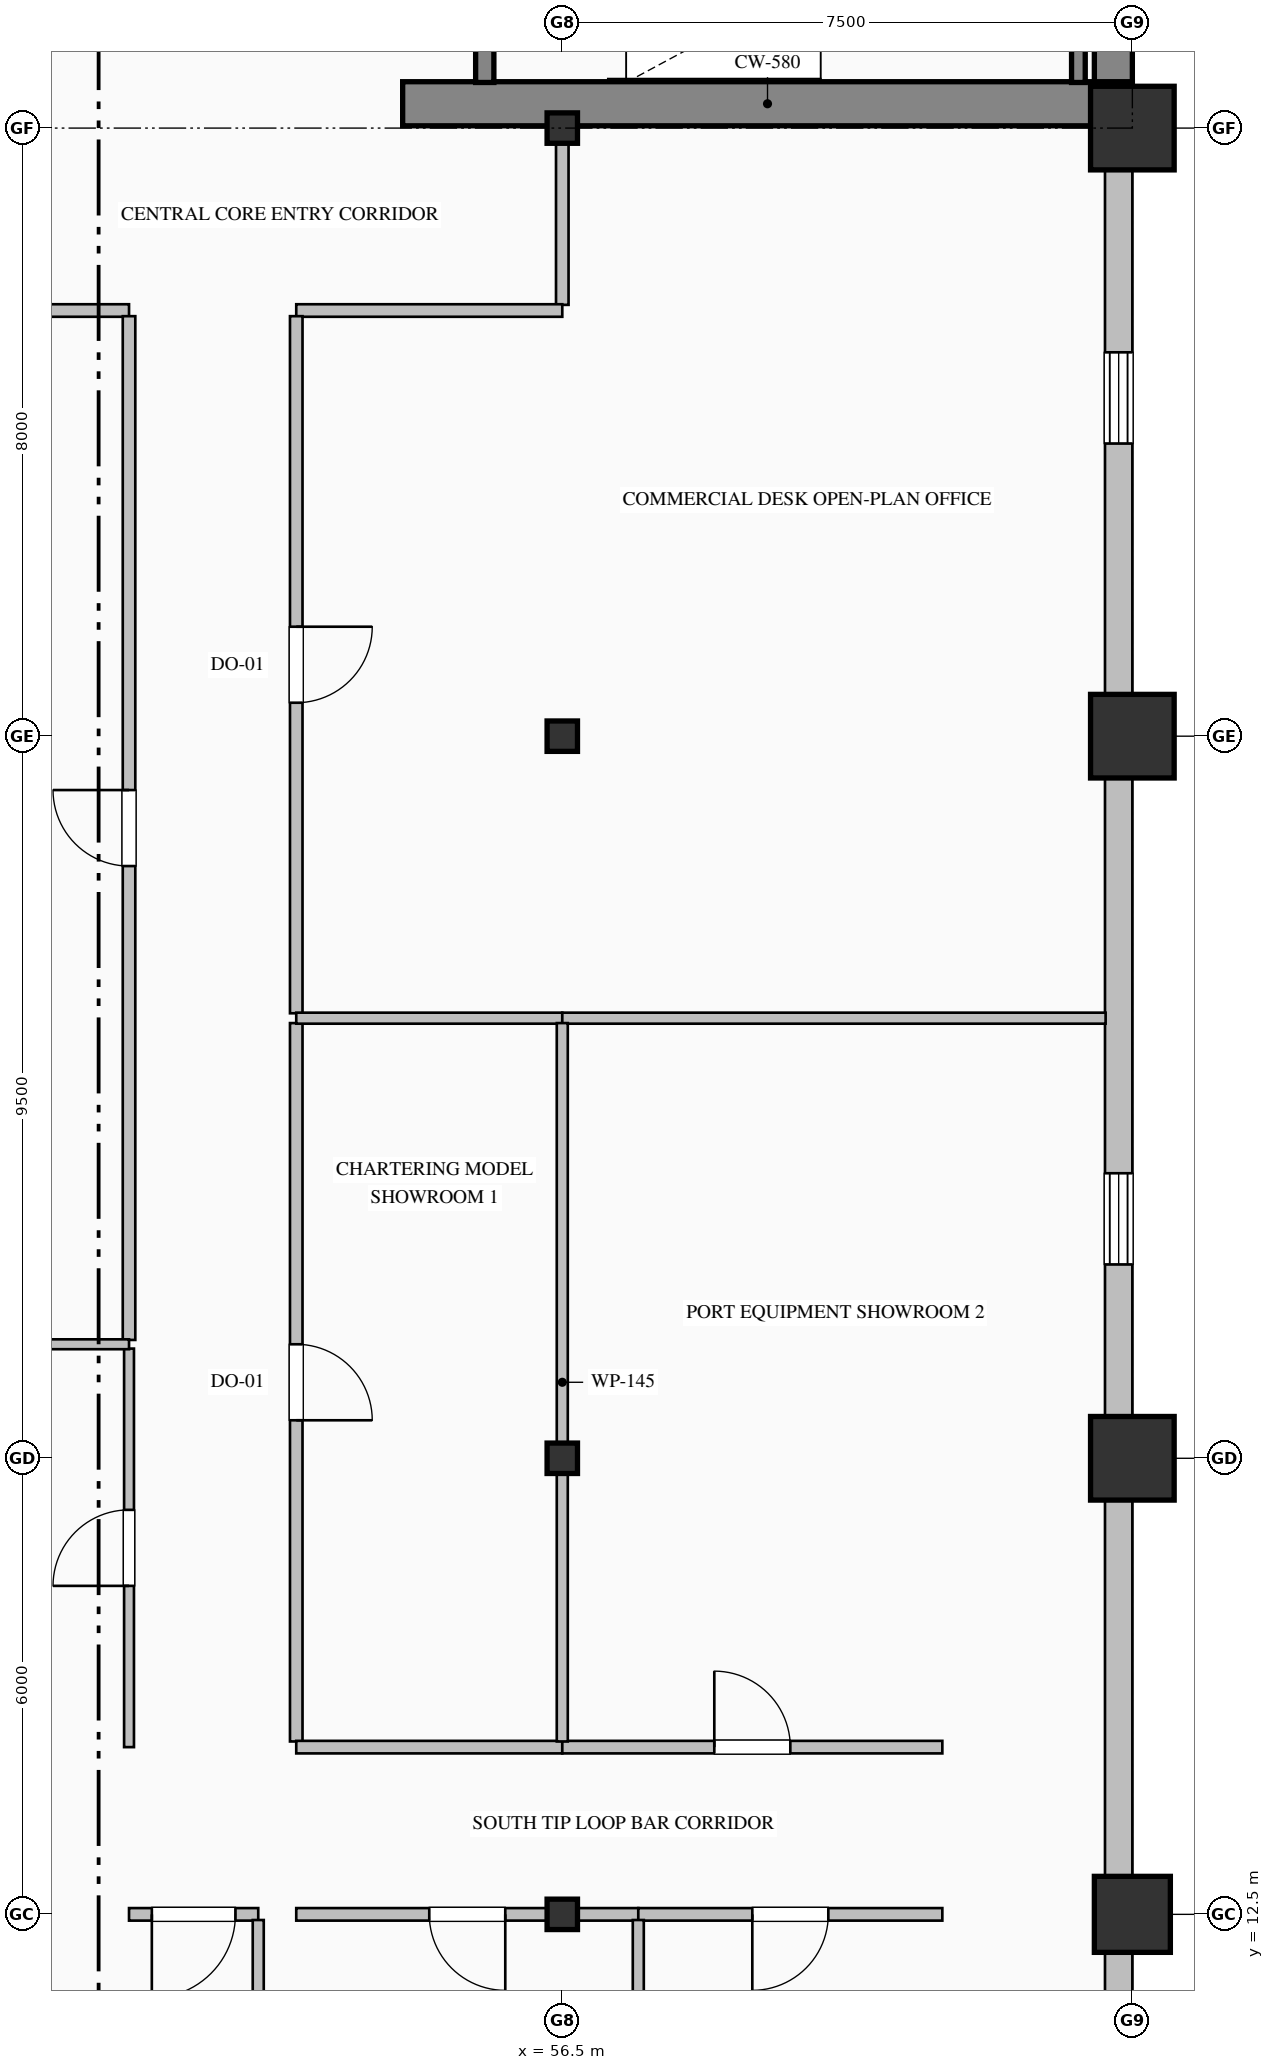
"""IFC4 building model, lengths in metres.
Left out: names, types, materials, properties, quantities, classifications, styles, units other than length and angle.
Written with IfcOpenShell. Run it as: python <this file> out.ifc"""

import sys

from ifc_helpers import new_model, si_unit, direction, frame, frame_2d, origin, origin_2d, place, context, subcontext, project, spatial, rectangle, hollow_rectangle, hollow_circle, i_section, extrude, element, fill, save


model = new_model("IFC4")
c1 = context("Model", 3, precision=1e-05, world=origin(), true_north=direction((0.0, 1.0)))
c2 = subcontext(c1, "Body", "Model", "MODEL_VIEW")
j1 = project(units=[si_unit("LENGTHUNIT", "METRE"), si_unit("PLANEANGLEUNIT", "RADIAN")], contexts=[c1])
p1 = place(None, origin())
s1 = spatial("IfcSite", under=j1, at=p1, CompositionType="ELEMENT")
p2 = place(p1, origin())
s2 = spatial("IfcBuilding", under=s1, at=p2, CompositionType="ELEMENT")
p3 = place(p2, frame((0.0, 0.0, 183.0)))
s3 = spatial("IfcBuildingStorey", under=s2, at=p3, CompositionType="ELEMENT", Elevation=183.0)
p4 = place(p3, frame((63.75, 36.32, 0.0), z_axis=(0.0, 0.0, 1.0), x_axis=(0.0, 1.0, 0.0)))
e1 = element("IfcWall", 1, at=p4, inside=s3, PredefinedType="SHEAR", context=c2, shape_type="SweptSolid", body=[
    extrude(rectangle(XDim=15.18, YDim=0.5, at=frame_2d((7.59, 0.0))), origin(), (0.0, 0.0, 1.0), 3.765),
])
p5 = place(p3, frame((54.4, 36.32, 0.0), z_axis=(0.0, 0.0, 1.0), x_axis=(1.0, 0.0, 0.0)))
e2 = element("IfcWall", 2, at=p5, inside=s3, PredefinedType="SHEAR", context=c2, shape_type="SweptSolid", body=[
    extrude(rectangle(XDim=9.6, YDim=0.58, at=frame_2d((4.8, 0.0))), origin(), (0.0, 0.0, 1.0), 4.0),
])
for number, where, z_axis, x_axis in (
    (3, (56.5, 12.5, 0.0), (0.0, 0.0, 1.0), (1.0, 0.0, 0.0)),
    (4, (56.5, 18.5, 0.0), (0.0, 0.0, 1.0), (1.0, 0.0, 0.0)),
    (5, (56.5, 28.0, 0.0), (0.0, 0.0, 1.0), (1.0, 0.0, 0.0)),
    (6, (56.5, 36.0, 0.0), (0.0, 0.0, 1.0), (1.0, 0.0, 0.0)),
):
    element("IfcColumn", number, at=place(p3, frame(where, z_axis=z_axis, x_axis=x_axis)), inside=s3, PredefinedType="COLUMN", context=c2, shape_type="SweptSolid", body=[
        extrude(i_section(OverallWidth=0.4, OverallDepth=0.4, WebThickness=0.013, FlangeThickness=0.021, FilletRadius=0.022, at=origin_2d()), origin(), (0.0, 0.0, 1.0), 4.0),
    ])
p6 = place(p3, frame((64.0, 12.5, 0.0), z_axis=(0.0, 0.0, 1.0), x_axis=(1.0, 0.0, 0.0)))
e7 = element("IfcColumn", 7, at=p6, inside=s3, PredefinedType="COLUMN", context=c2, shape_type="SweptSolid", body=[
    extrude(hollow_circle(Radius=0.5, WallThickness=0.036, at=origin_2d()), origin(), (0.0, 0.0, 1.0), 4.0),
])
for number, where, z_axis, x_axis in (
    (8, (64.0, 18.5, 0.0), (0.0, 0.0, 1.0), (1.0, 0.0, 0.0)),
    (9, (64.0, 28.0, 0.0), (0.0, 0.0, 1.0), (1.0, 0.0, 0.0)),
    (10, (64.0, 36.0, 0.0), (0.0, 0.0, 1.0), (1.0, 0.0, 0.0)),
):
    element("IfcColumn", number, at=place(p3, frame(where, z_axis=z_axis, x_axis=x_axis)), inside=s3, PredefinedType="COLUMN", context=c2, shape_type="SweptSolid", body=[
        extrude(hollow_rectangle(XDim=1.1, YDim=1.1, WallThickness=0.04, at=origin_2d()), origin(), (0.0, 0.0, 1.0), 4.0),
    ])
p7 = place(p3, frame((63.82, 36.05, 0.0), z_axis=(0.0, 0.0, 1.0), x_axis=(0.0, -1.0, 0.0)))
e11 = element("IfcWall", 11, at=p7, inside=s3, PredefinedType="SOLIDWALL", context=c2, shape_type="SweptSolid", body=[
    extrude(rectangle(XDim=28.05, YDim=0.36, at=frame_2d((14.025, 0.0))), origin(), (0.0, 0.0, 1.0), 3.265),
])
p8 = place(p7, frame((3.0, 0.0, 0.7)))
e12 = element("IfcOpeningElement", 12, at=p8, cuts=e11, PredefinedType="OPENING", context=c2, shape_type="SweptSolid", body=[
    extrude(rectangle(XDim=1.2, YDim=1.85, at=frame_2d((0.6, 0.925))), frame((0.0, 0.19, 0.0), z_axis=(0.0, -1.0, 0.0), x_axis=(1.0, 0.0, 0.0)), (0.0, 0.0, 1.0), 0.38),
])
p9 = place(p7, frame((13.8, 0.0, 0.7)))
e13 = element("IfcOpeningElement", 13, at=p9, cuts=e11, PredefinedType="OPENING", context=c2, shape_type="SweptSolid", body=[
    extrude(rectangle(XDim=1.2, YDim=1.85, at=frame_2d((0.6, 0.925))), frame((0.0, 0.19, 0.0), z_axis=(0.0, -1.0, 0.0), x_axis=(1.0, 0.0, 0.0)), (0.0, 0.0, 1.0), 0.38),
])
p10 = place(p7, frame((24.6, 0.0, 0.7)))
e14 = element("IfcOpeningElement", 14, at=p10, cuts=e11, PredefinedType="OPENING", context=c2, shape_type="SweptSolid", body=[
    extrude(rectangle(XDim=1.2, YDim=1.85, at=frame_2d((0.6, 0.925))), frame((0.0, 0.19, 0.0), z_axis=(0.0, -1.0, 0.0), x_axis=(1.0, 0.0, 0.0)), (0.0, 0.0, 1.0), 0.38),
])
p11 = place(p3, frame((55.48, 39.75, 0.0), z_axis=(0.0, 0.0, 1.0), x_axis=(0.0, -1.0, 0.0)))
e15 = element("IfcWall", 15, at=p11, inside=s3, PredefinedType="SOLIDWALL", context=c2, shape_type="SweptSolid", body=[
    extrude(rectangle(XDim=3.15, YDim=0.24, at=frame_2d((1.575, 0.0))), origin(), (0.0, 0.0, 1.0), 4.0),
])
p12 = place(p11, frame((1.0, 0.0, 0.0)))
e16 = element("IfcOpeningElement", 16, at=p12, cuts=e15, PredefinedType="OPENING", context=c2, shape_type="SweptSolid", body=[
    extrude(rectangle(XDim=1.15, YDim=2.2, at=frame_2d((0.575, 1.1))), frame((0.0, 0.13, 0.0), z_axis=(0.0, -1.0, 0.0), x_axis=(1.0, 0.0, 0.0)), (0.0, 0.0, 1.0), 0.26),
])
p13 = place(p3, frame((63.29, 36.6, 0.0), z_axis=(0.0, 0.0, 1.0), x_axis=(0.0, 1.0, 0.0)))
e17 = element("IfcWall", 17, at=p13, inside=s3, PredefinedType="SOLIDWALL", context=c2, shape_type="SweptSolid", body=[
    extrude(rectangle(XDim=3.15, YDim=0.18, at=frame_2d((1.575, 0.0))), origin(), (0.0, 0.0, 1.0), 4.0),
])
p14 = place(p3, frame((56.5, 36.0, 0.0), z_axis=(0.0, 0.0, 1.0), x_axis=(0.0, -1.0, 0.0)))
e18 = element("IfcWall", 18, at=p14, inside=s3, PredefinedType="PARTITIONING", context=c2, shape_type="SweptSolid", body=[
    extrude(rectangle(XDim=2.325, YDim=0.165, at=frame_2d((1.163, 0.0))), origin(), (0.0, 0.0, 1.0), 3.157),
])
p15 = place(p3, frame((56.5, 33.6, 0.0), z_axis=(0.0, 0.0, 1.0), x_axis=(-1.0, 0.0, 0.0)))
e19 = element("IfcWall", 19, at=p15, inside=s3, PredefinedType="PARTITIONING", context=c2, shape_type="SweptSolid", body=[
    extrude(rectangle(XDim=3.5, YDim=0.165, at=frame_2d((1.75, 0.0))), origin(), (0.0, 0.0, 1.0), 3.765),
])
p16 = place(p3, frame((50.8, 33.6, 0.0), z_axis=(0.0, 0.0, 1.0), x_axis=(-1.0, 0.0, 0.0)))
e20 = element("IfcWall", 20, at=p16, inside=s3, PredefinedType="PARTITIONING", context=c2, shape_type="SweptSolid", body=[
    extrude(rectangle(XDim=10.3, YDim=0.165, at=frame_2d((5.15, 0.0))), origin(), (0.0, 0.0, 1.0), 3.765),
])
p17 = place(p3, frame((53.0, 33.525, 0.0), z_axis=(0.0, 0.0, 1.0), x_axis=(0.0, -1.0, 0.0)))
e21 = element("IfcWall", 21, at=p17, inside=s3, PredefinedType="PARTITIONING", context=c2, shape_type="SweptSolid", body=[
    extrude(rectangle(XDim=9.171, YDim=0.165, at=frame_2d((4.585, 0.0))), origin(), (0.0, 0.0, 1.0), 3.765),
])
p18 = place(p17, frame((4.085, 0.0, 0.0)))
e22 = element("IfcOpeningElement", 22, at=p18, cuts=e21, PredefinedType="OPENING", context=c2, shape_type="SweptSolid", body=[
    extrude(rectangle(XDim=1.0, YDim=2.15, at=frame_2d((0.5, 1.075))), frame((0.0, 0.093, 0.0), z_axis=(0.0, -1.0, 0.0), x_axis=(1.0, 0.0, 0.0)), (0.0, 0.0, 1.0), 0.185),
])
p19 = place(p3, frame((53.0, 24.226, 0.0), z_axis=(0.0, 0.0, 1.0), x_axis=(0.0, -1.0, 0.0)))
e23 = element("IfcWall", 23, at=p19, inside=s3, PredefinedType="PARTITIONING", context=c2, shape_type="SweptSolid", body=[
    extrude(rectangle(XDim=9.451, YDim=0.165, at=frame_2d((4.726, 0.0))), origin(), (0.0, 0.0, 1.0), 3.765),
])
p20 = place(p19, frame((4.226, 0.0, 0.0)))
e24 = element("IfcOpeningElement", 24, at=p20, cuts=e23, PredefinedType="OPENING", context=c2, shape_type="SweptSolid", body=[
    extrude(rectangle(XDim=1.0, YDim=2.15, at=frame_2d((0.5, 1.075))), frame((0.0, 0.093, 0.0), z_axis=(0.0, -1.0, 0.0), x_axis=(1.0, 0.0, 0.0)), (0.0, 0.0, 1.0), 0.185),
])
p21 = place(p3, frame((50.8, 14.7, 0.0), z_axis=(0.0, 0.0, 1.0), x_axis=(0.0, 1.0, 0.0)))
e25 = element("IfcWall", 25, at=p21, inside=s3, PredefinedType="PARTITIONING", context=c2, shape_type="SweptSolid", body=[
    extrude(rectangle(XDim=5.243, YDim=0.13, at=frame_2d((2.622, 0.0))), origin(), (0.0, 0.0, 1.0), 3.765),
])
p22 = place(p21, frame((2.122, 0.0, 0.0)))
e26 = element("IfcOpeningElement", 26, at=p22, cuts=e25, PredefinedType="OPENING", context=c2, shape_type="SweptSolid", body=[
    extrude(rectangle(XDim=1.0, YDim=2.15, at=frame_2d((0.5, 1.075))), frame((0.0, 0.075, 0.0), z_axis=(0.0, -1.0, 0.0), x_axis=(1.0, 0.0, 0.0)), (0.0, 0.0, 1.0), 0.15),
])
p23 = place(p3, frame((50.8, 20.057, 0.0), z_axis=(0.0, 0.0, 1.0), x_axis=(0.0, 1.0, 0.0)))
e27 = element("IfcWall", 27, at=p23, inside=s3, PredefinedType="PARTITIONING", context=c2, shape_type="SweptSolid", body=[
    extrude(rectangle(XDim=13.469, YDim=0.165, at=frame_2d((6.734, 0.0))), origin(), (0.0, 0.0, 1.0), 3.765),
])
p24 = place(p23, frame((6.234, 0.0, 0.0)))
e28 = element("IfcOpeningElement", 28, at=p24, cuts=e27, PredefinedType="OPENING", context=c2, shape_type="SweptSolid", body=[
    extrude(rectangle(XDim=1.0, YDim=2.15, at=frame_2d((0.5, 1.075))), frame((0.0, 0.093, 0.0), z_axis=(0.0, -1.0, 0.0), x_axis=(1.0, 0.0, 0.0)), (0.0, 0.0, 1.0), 0.185),
])
p25 = place(p3, frame((52.5, 12.5, 0.0), z_axis=(0.0, 0.0, 1.0), x_axis=(-1.0, 0.0, 0.0)))
e29 = element("IfcWall", 29, at=p25, inside=s3, PredefinedType="PARTITIONING", context=c2, shape_type="SweptSolid", body=[
    extrude(rectangle(XDim=1.7, YDim=0.165, at=frame_2d((0.85, 0.0))), origin(), (0.0, 0.0, 1.0), 3.157),
])
p26 = place(p25, frame((0.3, 0.0, 0.0)))
e30 = element("IfcOpeningElement", 30, at=p26, cuts=e29, PredefinedType="OPENING", context=c2, shape_type="SweptSolid", body=[
    extrude(rectangle(XDim=1.1, YDim=2.2, at=frame_2d((0.55, 1.1))), frame((0.0, 0.093, 0.0), z_axis=(0.0, -1.0, 0.0), x_axis=(1.0, 0.0, 0.0)), (0.0, 0.0, 1.0), 0.185),
])
p27 = place(p3, frame((53.0, 14.7, 0.0), z_axis=(0.0, 0.0, 1.0), x_axis=(1.0, 0.0, 0.0)))
e31 = element("IfcWall", 31, at=p27, inside=s3, PredefinedType="PARTITIONING", context=c2, shape_type="SweptSolid", body=[
    extrude(rectangle(XDim=3.5, YDim=0.165, at=frame_2d((1.75, 0.0))), origin(), (0.0, 0.0, 1.0), 3.765),
])
p28 = place(p3, frame((56.5, 14.7, 0.0), z_axis=(0.0, 0.0, 1.0), x_axis=(1.0, 0.0, 0.0)))
e32 = element("IfcWall", 32, at=p28, inside=s3, PredefinedType="PARTITIONING", context=c2, shape_type="SweptSolid", body=[
    extrude(rectangle(XDim=5.0, YDim=0.165, at=frame_2d((2.5, 0.0))), origin(), (0.0, 0.0, 1.0), 3.765),
])
p29 = place(p28, frame((2.0, 0.0, 0.0)))
e33 = element("IfcOpeningElement", 33, at=p29, cuts=e32, PredefinedType="OPENING", context=c2, shape_type="SweptSolid", body=[
    extrude(rectangle(XDim=1.0, YDim=2.15, at=frame_2d((0.5, 1.075))), frame((0.0, 0.093, 0.0), z_axis=(0.0, -1.0, 0.0), x_axis=(1.0, 0.0, 0.0)), (0.0, 0.0, 1.0), 0.185),
])
p30 = place(p3, frame((57.5, 12.5, 0.0), z_axis=(0.0, 0.0, 1.0), x_axis=(-1.0, 0.0, 0.0)))
e34 = element("IfcWall", 34, at=p30, inside=s3, PredefinedType="PARTITIONING", context=c2, shape_type="SweptSolid", body=[
    extrude(rectangle(XDim=4.5, YDim=0.165, at=frame_2d((2.25, 0.0))), origin(), (0.0, 0.0, 1.0), 3.157),
])
p31 = place(p30, frame((1.75, 0.0, 0.0)))
e35 = element("IfcOpeningElement", 35, at=p31, cuts=e34, PredefinedType="OPENING", context=c2, shape_type="SweptSolid", body=[
    extrude(rectangle(XDim=1.0, YDim=2.15, at=frame_2d((0.5, 1.075))), frame((0.0, 0.093, 0.0), z_axis=(0.0, -1.0, 0.0), x_axis=(1.0, 0.0, 0.0)), (0.0, 0.0, 1.0), 0.185),
])
p32 = place(p3, frame((61.5, 12.5, 0.0), z_axis=(0.0, 0.0, 1.0), x_axis=(-1.0, 0.0, 0.0)))
e36 = element("IfcWall", 36, at=p32, inside=s3, PredefinedType="PARTITIONING", context=c2, shape_type="SweptSolid", body=[
    extrude(rectangle(XDim=4.0, YDim=0.165, at=frame_2d((2.0, 0.0))), origin(), (0.0, 0.0, 1.0), 3.157),
])
p33 = place(p32, frame((1.5, 0.0, 0.0)))
e37 = element("IfcOpeningElement", 37, at=p33, cuts=e36, PredefinedType="OPENING", context=c2, shape_type="SweptSolid", body=[
    extrude(rectangle(XDim=1.0, YDim=2.15, at=frame_2d((0.5, 1.075))), frame((0.0, 0.093, 0.0), z_axis=(0.0, -1.0, 0.0), x_axis=(1.0, 0.0, 0.0)), (0.0, 0.0, 1.0), 0.185),
])
p34 = place(p3, frame((56.5, 24.29, 0.0), z_axis=(0.0, 0.0, 1.0), x_axis=(-1.0, 0.0, 0.0)))
e38 = element("IfcWall", 38, at=p34, inside=s3, PredefinedType="PARTITIONING", context=c2, shape_type="SweptSolid", body=[
    extrude(rectangle(XDim=3.5, YDim=0.145, at=frame_2d((1.75, 0.0))), origin(), (0.0, 0.0, 1.0), 3.765),
])
p35 = place(p3, frame((63.648, 24.29, 0.0), z_axis=(0.0, 0.0, 1.0), x_axis=(-1.0, 0.0, 0.0)))
e39 = element("IfcWall", 39, at=p35, inside=s3, PredefinedType="PARTITIONING", context=c2, shape_type="SweptSolid", body=[
    extrude(rectangle(XDim=7.148, YDim=0.145, at=frame_2d((3.574, 0.0))), origin(), (0.0, 0.0, 1.0), 3.765),
])
p36 = place(p3, frame((56.5, 24.226, 0.0), z_axis=(0.0, 0.0, 1.0), x_axis=(0.0, -1.0, 0.0)))
e40 = element("IfcWall", 40, at=p36, inside=s3, PredefinedType="PARTITIONING", context=c2, shape_type="SweptSolid", body=[
    extrude(rectangle(XDim=9.451, YDim=0.145, at=frame_2d((4.726, 0.0))), origin(), (0.0, 0.0, 1.0), 2.957),
])
p37 = place(p3, frame((40.852, 20.0, 0.0), z_axis=(0.0, 0.0, 1.0), x_axis=(1.0, 0.0, 0.0)))
e41 = element("IfcWall", 41, at=p37, inside=s3, PredefinedType="PARTITIONING", context=c2, shape_type="SweptSolid", body=[
    extrude(rectangle(XDim=9.948, YDim=0.13, at=frame_2d((4.974, 0.0))), origin(), (0.0, 0.0, 1.0), 3.765),
])
for number, where, z_axis, x_axis in (
    (42, (52.5, 12.426, 0.0), (0.0, 0.0, 1.0), (0.0, -1.0, 0.0)),
    (43, (57.5, 12.426, 0.0), (0.0, 0.0, 1.0), (0.0, -1.0, 0.0)),
):
    element("IfcWall", number, at=place(p3, frame(where, z_axis=z_axis, x_axis=x_axis)), inside=s3, PredefinedType="PARTITIONING", context=c2, shape_type="SweptSolid", body=[
        extrude(rectangle(XDim=8.073, YDim=0.145, at=frame_2d((4.037, 0.0))), origin(), (0.0, 0.0, 1.0), 3.765),
    ])
p38 = place(p8, origin())
e44 = element("IfcWindow", 44, at=p38, inside=s3, PartitioningType="DOUBLE_PANEL_VERTICAL", PredefinedType="WINDOW", context=c2, shape_type="SweptSolid", body=[
    extrude(rectangle(XDim=1.2, YDim=1.85, at=frame_2d((0.6, 0.925))), frame((0.0, 0.15, 0.0), z_axis=(0.0, -1.0, 0.0), x_axis=(1.0, 0.0, 0.0)), (0.0, 0.0, 1.0), 0.06),
])
fill(e12, e44)
p39 = place(p9, origin())
e45 = element("IfcWindow", 45, at=p39, inside=s3, PartitioningType="DOUBLE_PANEL_VERTICAL", PredefinedType="WINDOW", context=c2, shape_type="SweptSolid", body=[
    extrude(rectangle(XDim=1.2, YDim=1.85, at=frame_2d((0.6, 0.925))), frame((0.0, 0.15, 0.0), z_axis=(0.0, -1.0, 0.0), x_axis=(1.0, 0.0, 0.0)), (0.0, 0.0, 1.0), 0.06),
])
fill(e13, e45)
p40 = place(p18, origin())
e46 = element("IfcDoor", 46, at=p40, inside=s3, OperationType="SINGLE_SWING_LEFT", PredefinedType="DOOR", context=c2, shape_type="SweptSolid", body=[
    extrude(rectangle(XDim=1.0, YDim=2.15, at=frame_2d((0.5, 1.075))), frame((0.0, 0.025, 0.0), z_axis=(0.0, -1.0, 0.0), x_axis=(1.0, 0.0, 0.0)), (0.0, 0.0, 1.0), 0.05),
])
fill(e22, e46)
p41 = place(p20, origin())
e47 = element("IfcDoor", 47, at=p41, inside=s3, OperationType="SINGLE_SWING_RIGHT", PredefinedType="DOOR", context=c2, shape_type="SweptSolid", body=[
    extrude(rectangle(XDim=1.0, YDim=2.15, at=frame_2d((0.5, 1.075))), frame((0.0, 0.025, 0.0), z_axis=(0.0, -1.0, 0.0), x_axis=(1.0, 0.0, 0.0)), (0.0, 0.0, 1.0), 0.05),
])
fill(e24, e47)
p42 = place(p29, origin())
e48 = element("IfcDoor", 48, at=p42, inside=s3, OperationType="SINGLE_SWING_LEFT", PredefinedType="DOOR", context=c2, shape_type="SweptSolid", body=[
    extrude(rectangle(XDim=1.0, YDim=2.15, at=frame_2d((0.5, 1.075))), frame((0.0, 0.025, 0.0), z_axis=(0.0, -1.0, 0.0), x_axis=(1.0, 0.0, 0.0)), (0.0, 0.0, 1.0), 0.05),
])
fill(e33, e48)
p43 = place(p22, origin())
e49 = element("IfcDoor", 49, at=p43, inside=s3, OperationType="SINGLE_SWING_LEFT", PredefinedType="DOOR", context=c2, shape_type="SweptSolid", body=[
    extrude(rectangle(XDim=1.0, YDim=2.15, at=frame_2d((0.5, 1.075))), frame((0.0, 0.025, 0.0), z_axis=(0.0, -1.0, 0.0), x_axis=(1.0, 0.0, 0.0)), (0.0, 0.0, 1.0), 0.05),
])
fill(e26, e49)
p44 = place(p24, origin())
e50 = element("IfcDoor", 50, at=p44, inside=s3, OperationType="SINGLE_SWING_RIGHT", PredefinedType="DOOR", context=c2, shape_type="SweptSolid", body=[
    extrude(rectangle(XDim=1.0, YDim=2.15, at=frame_2d((0.5, 1.075))), frame((0.0, 0.025, 0.0), z_axis=(0.0, -1.0, 0.0), x_axis=(1.0, 0.0, 0.0)), (0.0, 0.0, 1.0), 0.05),
])
fill(e28, e50)
p45 = place(p26, origin())
e51 = element("IfcDoor", 51, at=p45, inside=s3, OperationType="SINGLE_SWING_RIGHT", PredefinedType="DOOR", context=c2, shape_type="SweptSolid", body=[
    extrude(rectangle(XDim=1.1, YDim=2.2, at=frame_2d((0.55, 1.1))), frame((0.0, 0.025, 0.0), z_axis=(0.0, -1.0, 0.0), x_axis=(1.0, 0.0, 0.0)), (0.0, 0.0, 1.0), 0.05),
])
fill(e30, e51)
p46 = place(p31, origin())
e52 = element("IfcDoor", 52, at=p46, inside=s3, OperationType="SINGLE_SWING_LEFT", PredefinedType="DOOR", context=c2, shape_type="SweptSolid", body=[
    extrude(rectangle(XDim=1.0, YDim=2.15, at=frame_2d((0.5, 1.075))), frame((0.0, 0.025, 0.0), z_axis=(0.0, -1.0, 0.0), x_axis=(1.0, 0.0, 0.0)), (0.0, 0.0, 1.0), 0.05),
])
fill(e35, e52)
p47 = place(p33, origin())
e53 = element("IfcDoor", 53, at=p47, inside=s3, OperationType="SINGLE_SWING_RIGHT", PredefinedType="DOOR", context=c2, shape_type="SweptSolid", body=[
    extrude(rectangle(XDim=1.0, YDim=2.15, at=frame_2d((0.5, 1.075))), frame((0.0, 0.025, 0.0), z_axis=(0.0, -1.0, 0.0), x_axis=(1.0, 0.0, 0.0)), (0.0, 0.0, 1.0), 0.05),
])
fill(e37, e53)
save(model, sys.argv[1])
